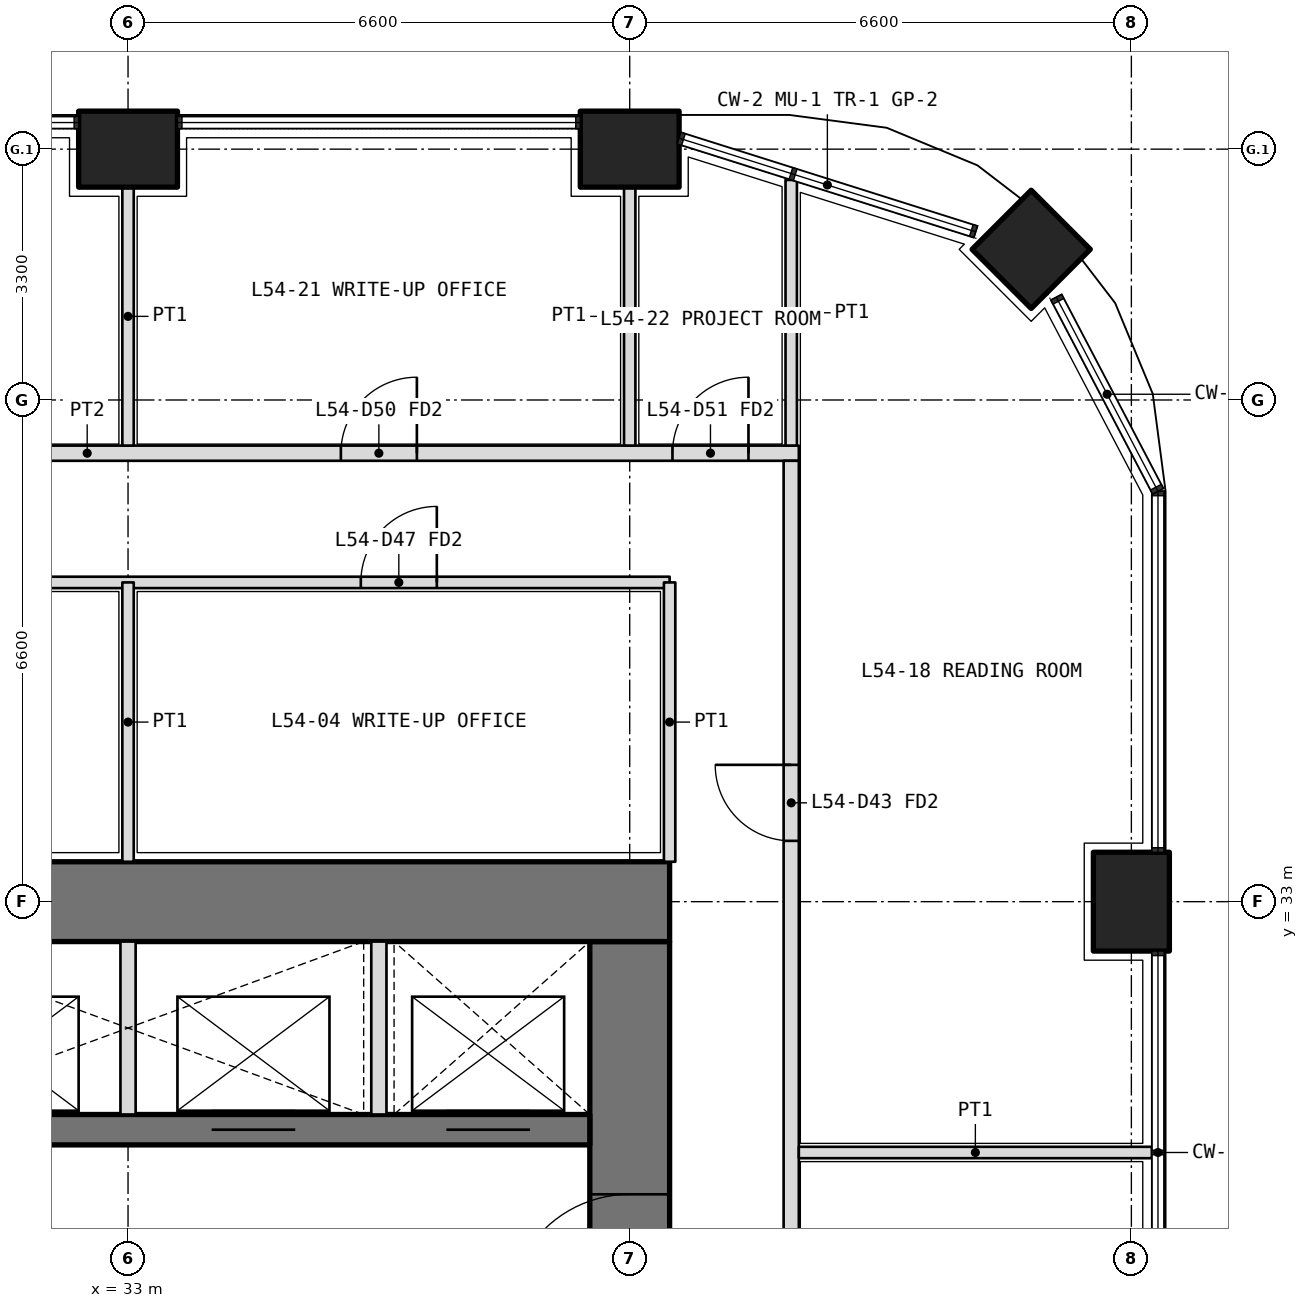
"""IFC4 building model, lengths in metres.
Left out: names, types, materials, properties, quantities, classifications, styles, units other than length and angle.
Written with IfcOpenShell. Run it as: python <this file> out.ifc"""

import sys

from ifc_helpers import new_model, si_unit, direction, frame, frame_2d, origin, origin_2d, place, context, subcontext, project, spatial, rectangle, extrude, element, fill, save


model = new_model("IFC4")
c1 = context("Model", 3, precision=1e-05, world=origin(), true_north=direction((0.0, 1.0)))
c2 = subcontext(c1, "Body", "Model", "MODEL_VIEW")
j1 = project(units=[si_unit("LENGTHUNIT", "METRE"), si_unit("PLANEANGLEUNIT", "RADIAN")], contexts=[c1])
p1 = place(None, origin())
s1 = spatial("IfcSite", under=j1, at=p1, CompositionType="ELEMENT")
p2 = place(p1, origin())
s2 = spatial("IfcBuilding", under=s1, at=p2, CompositionType="ELEMENT")
p3 = place(p2, frame((0.0, 0.0, 237.6)))
s3 = spatial("IfcBuildingStorey", under=s2, at=p3, CompositionType="ELEMENT", Elevation=237.6)
p4 = place(p3, frame((44.882, 41.582, 0.0), z_axis=(0.0, 0.0, 1.0), x_axis=(0.707106781187, 0.707106781187, 0.0)))
e1 = element("IfcColumn", 1, at=p4, inside=s3, PredefinedType="COLUMN", context=c2, shape_type="SweptSolid", body=[
    extrude(rectangle(XDim=1.1, YDim=1.1, at=origin_2d()), origin(), (0.0, 0.0, 1.0), 4.2),
])
for number, where, z_axis, x_axis in (
    (2, (46.2, 33.0, 0.0), (0.0, 0.0, 1.0), (0.0, 1.0, 0.0)),
    (3, (33.0, 42.9, 0.0), (0.0, 0.0, 1.0), (1.0, 0.0, 0.0)),
    (4, (39.6, 42.9, 0.0), (0.0, 0.0, 1.0), (1.0, 0.0, 0.0)),
):
    element("IfcColumn", number, at=place(p3, frame(where, z_axis=z_axis, x_axis=x_axis)), inside=s3, PredefinedType="COLUMN", context=c2, shape_type="SweptSolid", body=[
        extrude(rectangle(XDim=1.3, YDim=1.0, at=origin_2d()), origin(), (0.0, 0.0, 1.0), 4.2),
    ])
p5 = place(p3, frame((39.6, 13.725, 0.0), z_axis=(0.0, 0.0, 1.0), x_axis=(0.0, 1.0, 0.0)))
e5 = element("IfcWall", 5, at=p5, inside=s3, PredefinedType="SHEAR", context=c2, shape_type="SweptSolid", body=[
    extrude(rectangle(XDim=18.75, YDim=1.05, at=frame_2d((9.375, 0.0))), origin(), (0.0, 0.0, 1.0), 4.2),
])
p6 = place(p5, frame((3.025, 0.0, 0.0)))
e6 = element("IfcOpeningElement", 6, at=p6, cuts=e5, PredefinedType="OPENING", context=c2, shape_type="SweptSolid", body=[
    extrude(rectangle(XDim=1.6, YDim=2.1, at=frame_2d((0.8, 1.05))), frame((0.0, 0.535, 0.0), z_axis=(0.0, -1.0, 0.0), x_axis=(1.0, 0.0, 0.0)), (0.0, 0.0, 1.0), 1.07),
])
p7 = place(p5, frame((13.825, 0.0, 0.0)))
e7 = element("IfcOpeningElement", 7, at=p7, cuts=e5, PredefinedType="OPENING", context=c2, shape_type="SweptSolid", body=[
    extrude(rectangle(XDim=1.6, YDim=2.1, at=frame_2d((0.8, 1.05))), frame((0.0, 0.535, 0.0), z_axis=(0.0, -1.0, 0.0), x_axis=(1.0, 0.0, 0.0)), (0.0, 0.0, 1.0), 1.07),
])
p8 = place(p3, frame((40.125, 33.0, 0.0), z_axis=(0.0, 0.0, 1.0), x_axis=(-1.0, 0.0, 0.0)))
e8 = element("IfcWall", 8, at=p8, inside=s3, PredefinedType="SHEAR", context=c2, shape_type="SweptSolid", body=[
    extrude(rectangle(XDim=27.45, YDim=1.05, at=frame_2d((13.725, 0.0))), origin(), (0.0, 0.0, 1.0), 4.2),
])
p9 = place(p3, frame((13.725, 30.0, 0.0), z_axis=(0.0, 0.0, 1.0), x_axis=(1.0, 0.0, 0.0)))
e9 = element("IfcWall", 9, at=p9, inside=s3, PredefinedType="SHEAR", context=c2, shape_type="SweptSolid", body=[
    extrude(rectangle(XDim=25.35, YDim=0.4, at=frame_2d((12.675, 0.0))), origin(), (0.0, 0.0, 1.0), 4.2),
])
p10 = place(p9, frame((0.837, 0.0, 0.0)))
e10 = element("IfcOpeningElement", 10, at=p10, cuts=e9, PredefinedType="OPENING", context=c2, shape_type="SweptSolid", body=[
    extrude(rectangle(XDim=1.0, YDim=2.1, at=frame_2d((0.5, 1.05))), frame((0.0, 0.21, 0.0), z_axis=(0.0, -1.0, 0.0), x_axis=(1.0, 0.0, 0.0)), (0.0, 0.0, 1.0), 0.42),
])
p11 = place(p9, frame((3.925, 0.0, 0.0)))
e11 = element("IfcOpeningElement", 11, at=p11, cuts=e9, PredefinedType="OPENING", context=c2, shape_type="SweptSolid", body=[
    extrude(rectangle(XDim=1.0, YDim=2.1, at=frame_2d((0.5, 1.05))), frame((0.0, 0.21, 0.0), z_axis=(0.0, -1.0, 0.0), x_axis=(1.0, 0.0, 0.0)), (0.0, 0.0, 1.0), 0.42),
])
p12 = place(p9, frame((7.225, 0.0, 0.0)))
e12 = element("IfcOpeningElement", 12, at=p12, cuts=e9, PredefinedType="OPENING", context=c2, shape_type="SweptSolid", body=[
    extrude(rectangle(XDim=1.0, YDim=2.1, at=frame_2d((0.5, 1.05))), frame((0.0, 0.21, 0.0), z_axis=(0.0, -1.0, 0.0), x_axis=(1.0, 0.0, 0.0)), (0.0, 0.0, 1.0), 0.42),
])
p13 = place(p9, frame((10.525, 0.0, 0.0)))
e13 = element("IfcOpeningElement", 13, at=p13, cuts=e9, PredefinedType="OPENING", context=c2, shape_type="SweptSolid", body=[
    extrude(rectangle(XDim=1.0, YDim=2.1, at=frame_2d((0.5, 1.05))), frame((0.0, 0.21, 0.0), z_axis=(0.0, -1.0, 0.0), x_axis=(1.0, 0.0, 0.0)), (0.0, 0.0, 1.0), 0.42),
])
p14 = place(p9, frame((13.775, 0.0, 0.0)))
e14 = element("IfcOpeningElement", 14, at=p14, cuts=e9, PredefinedType="OPENING", context=c2, shape_type="SweptSolid", body=[
    extrude(rectangle(XDim=1.1, YDim=2.1, at=frame_2d((0.55, 1.05))), frame((0.0, 0.21, 0.0), z_axis=(0.0, -1.0, 0.0), x_axis=(1.0, 0.0, 0.0)), (0.0, 0.0, 1.0), 0.42),
])
p15 = place(p9, frame((17.075, 0.0, 0.0)))
e15 = element("IfcOpeningElement", 15, at=p15, cuts=e9, PredefinedType="OPENING", context=c2, shape_type="SweptSolid", body=[
    extrude(rectangle(XDim=1.1, YDim=2.1, at=frame_2d((0.55, 1.05))), frame((0.0, 0.21, 0.0), z_axis=(0.0, -1.0, 0.0), x_axis=(1.0, 0.0, 0.0)), (0.0, 0.0, 1.0), 0.42),
])
p16 = place(p9, frame((20.375, 0.0, 0.0)))
e16 = element("IfcOpeningElement", 16, at=p16, cuts=e9, PredefinedType="OPENING", context=c2, shape_type="SweptSolid", body=[
    extrude(rectangle(XDim=1.1, YDim=2.1, at=frame_2d((0.55, 1.05))), frame((0.0, 0.21, 0.0), z_axis=(0.0, -1.0, 0.0), x_axis=(1.0, 0.0, 0.0)), (0.0, 0.0, 1.0), 0.42),
])
p17 = place(p9, frame((23.462, 0.0, 0.0)))
e17 = element("IfcOpeningElement", 17, at=p17, cuts=e9, PredefinedType="OPENING", context=c2, shape_type="SweptSolid", body=[
    extrude(rectangle(XDim=1.1, YDim=2.1, at=frame_2d((0.55, 1.05))), frame((0.0, 0.21, 0.0), z_axis=(0.0, -1.0, 0.0), x_axis=(1.0, 0.0, 0.0)), (0.0, 0.0, 1.0), 0.42),
])
for number, where, z_axis, x_axis in (
    (18, (33.0, 30.2, 0.0), (0.0, 0.0, 1.0), (0.0, 1.0, 0.0)),
    (19, (36.3, 30.2, 0.0), (0.0, 0.0, 1.0), (0.0, 1.0, 0.0)),
):
    element("IfcWall", number, at=place(p3, frame(where, z_axis=z_axis, x_axis=x_axis)), inside=s3, PredefinedType="PARTITIONING", context=c2, shape_type="SweptSolid", body=[
        extrude(rectangle(XDim=2.275, YDim=0.2, at=frame_2d((1.138, 0.0))), origin(), (0.0, 0.0, 1.0), 4.2),
    ])
p18 = place(p3, frame((12.675, 37.2, 0.0), z_axis=(0.0, 0.0, 1.0), x_axis=(1.0, 0.0, 0.0)))
e20 = element("IfcWall", 20, at=p18, inside=s3, PredefinedType="PARTITIONING", context=c2, shape_type="SweptSolid", body=[
    extrude(rectangle(XDim=27.45, YDim=0.15, at=frame_2d((13.725, 0.0))), origin(), (0.0, 0.0, 1.0), 3.0),
])
p19 = place(p18, frame((1.413, 0.0, 0.0)))
e21 = element("IfcOpeningElement", 21, at=p19, cuts=e20, PredefinedType="OPENING", context=c2, shape_type="SweptSolid", body=[
    extrude(rectangle(XDim=1.0, YDim=2.1, at=frame_2d((0.5, 1.05))), frame((0.0, 0.085, 0.0), z_axis=(0.0, -1.0, 0.0), x_axis=(1.0, 0.0, 0.0)), (0.0, 0.0, 1.0), 0.17),
])
p20 = place(p18, frame((6.625, 0.0, 0.0)))
e22 = element("IfcOpeningElement", 22, at=p20, cuts=e20, PredefinedType="OPENING", context=c2, shape_type="SweptSolid", body=[
    extrude(rectangle(XDim=1.0, YDim=2.1, at=frame_2d((0.5, 1.05))), frame((0.0, 0.085, 0.0), z_axis=(0.0, -1.0, 0.0), x_axis=(1.0, 0.0, 0.0)), (0.0, 0.0, 1.0), 0.17),
])
p21 = place(p18, frame((14.875, 0.0, 0.0)))
e23 = element("IfcOpeningElement", 23, at=p21, cuts=e20, PredefinedType="OPENING", context=c2, shape_type="SweptSolid", body=[
    extrude(rectangle(XDim=1.0, YDim=2.1, at=frame_2d((0.5, 1.05))), frame((0.0, 0.085, 0.0), z_axis=(0.0, -1.0, 0.0), x_axis=(1.0, 0.0, 0.0)), (0.0, 0.0, 1.0), 0.17),
])
p22 = place(p18, frame((23.387, 0.0, 0.0)))
e24 = element("IfcOpeningElement", 24, at=p22, cuts=e20, PredefinedType="OPENING", context=c2, shape_type="SweptSolid", body=[
    extrude(rectangle(XDim=1.0, YDim=2.1, at=frame_2d((0.5, 1.05))), frame((0.0, 0.085, 0.0), z_axis=(0.0, -1.0, 0.0), x_axis=(1.0, 0.0, 0.0)), (0.0, 0.0, 1.0), 0.17),
])
for number, where, z_axis, x_axis in (
    (25, (40.125, 33.525, 0.0), (0.0, 0.0, 1.0), (0.0, 1.0, 0.0)),
    (26, (33.0, 33.525, 0.0), (0.0, 0.0, 1.0), (0.0, 1.0, 0.0)),
):
    element("IfcWall", number, at=place(p3, frame(where, z_axis=z_axis, x_axis=x_axis)), inside=s3, PredefinedType="PARTITIONING", context=c2, shape_type="SweptSolid", body=[
        extrude(rectangle(XDim=3.675, YDim=0.15, at=frame_2d((1.837, 0.0))), origin(), (0.0, 0.0, 1.0), 3.0),
    ])
p23 = place(p3, frame((23.1, 38.9, 0.0), z_axis=(0.0, 0.0, 1.0), x_axis=(1.0, 0.0, 0.0)))
e27 = element("IfcWall", 27, at=p23, inside=s3, PredefinedType="PARTITIONING", context=c2, shape_type="SweptSolid", body=[
    extrude(rectangle(XDim=18.725, YDim=0.2, at=frame_2d((9.362, 0.0))), origin(), (0.0, 0.0, 1.0), 3.0),
])
p24 = place(p23, frame((4.45, 0.0, 0.0)))
e28 = element("IfcOpeningElement", 28, at=p24, cuts=e27, PredefinedType="OPENING", context=c2, shape_type="SweptSolid", body=[
    extrude(rectangle(XDim=1.0, YDim=2.1, at=frame_2d((0.5, 1.05))), frame((0.0, 0.11, 0.0), z_axis=(0.0, -1.0, 0.0), x_axis=(1.0, 0.0, 0.0)), (0.0, 0.0, 1.0), 0.22),
])
p25 = place(p23, frame((12.7, 0.0, 0.0)))
e29 = element("IfcOpeningElement", 29, at=p25, cuts=e27, PredefinedType="OPENING", context=c2, shape_type="SweptSolid", body=[
    extrude(rectangle(XDim=1.0, YDim=2.1, at=frame_2d((0.5, 1.05))), frame((0.0, 0.11, 0.0), z_axis=(0.0, -1.0, 0.0), x_axis=(1.0, 0.0, 0.0)), (0.0, 0.0, 1.0), 0.22),
])
p26 = place(p23, frame((17.062, 0.0, 0.0)))
e30 = element("IfcOpeningElement", 30, at=p26, cuts=e27, PredefinedType="OPENING", context=c2, shape_type="SweptSolid", body=[
    extrude(rectangle(XDim=1.0, YDim=2.1, at=frame_2d((0.5, 1.05))), frame((0.0, 0.11, 0.0), z_axis=(0.0, -1.0, 0.0), x_axis=(1.0, 0.0, 0.0)), (0.0, 0.0, 1.0), 0.22),
])
p27 = place(p3, frame((41.725, 7.4, 0.0), z_axis=(0.0, 0.0, 1.0), x_axis=(0.0, 1.0, 0.0)))
e31 = element("IfcWall", 31, at=p27, inside=s3, PredefinedType="PARTITIONING", context=c2, shape_type="SweptSolid", body=[
    extrude(rectangle(XDim=31.4, YDim=0.2, at=frame_2d((15.7, 0.0))), origin(), (0.0, 0.0, 1.0), 3.0),
])
p28 = place(p27, frame((5.65, 0.0, 0.0)))
e32 = element("IfcOpeningElement", 32, at=p28, cuts=e31, PredefinedType="OPENING", context=c2, shape_type="SweptSolid", body=[
    extrude(rectangle(XDim=1.0, YDim=2.1, at=frame_2d((0.5, 1.05))), frame((0.0, 0.11, 0.0), z_axis=(0.0, -1.0, 0.0), x_axis=(1.0, 0.0, 0.0)), (0.0, 0.0, 1.0), 0.22),
])
p29 = place(p27, frame((13.4, 0.0, 0.0)))
e33 = element("IfcOpeningElement", 33, at=p29, cuts=e31, PredefinedType="OPENING", context=c2, shape_type="SweptSolid", body=[
    extrude(rectangle(XDim=1.0, YDim=2.1, at=frame_2d((0.5, 1.05))), frame((0.0, 0.11, 0.0), z_axis=(0.0, -1.0, 0.0), x_axis=(1.0, 0.0, 0.0)), (0.0, 0.0, 1.0), 0.22),
])
p30 = place(p27, frame((16.75, 0.0, 0.0)))
e34 = element("IfcOpeningElement", 34, at=p30, cuts=e31, PredefinedType="OPENING", context=c2, shape_type="SweptSolid", body=[
    extrude(rectangle(XDim=0.9, YDim=2.1, at=frame_2d((0.45, 1.05))), frame((0.0, 0.11, 0.0), z_axis=(0.0, -1.0, 0.0), x_axis=(1.0, 0.0, 0.0)), (0.0, 0.0, 1.0), 0.22),
])
p31 = place(p27, frame((20.15, 0.0, 0.0)))
e35 = element("IfcOpeningElement", 35, at=p31, cuts=e31, PredefinedType="OPENING", context=c2, shape_type="SweptSolid", body=[
    extrude(rectangle(XDim=1.0, YDim=2.1, at=frame_2d((0.5, 1.05))), frame((0.0, 0.11, 0.0), z_axis=(0.0, -1.0, 0.0), x_axis=(1.0, 0.0, 0.0)), (0.0, 0.0, 1.0), 0.22),
])
p32 = place(p27, frame((26.4, 0.0, 0.0)))
e36 = element("IfcOpeningElement", 36, at=p32, cuts=e31, PredefinedType="OPENING", context=c2, shape_type="SweptSolid", body=[
    extrude(rectangle(XDim=1.0, YDim=2.1, at=frame_2d((0.5, 1.05))), frame((0.0, 0.11, 0.0), z_axis=(0.0, -1.0, 0.0), x_axis=(1.0, 0.0, 0.0)), (0.0, 0.0, 1.0), 0.22),
])
p33 = place(p3, frame((41.725, 42.495, 0.0), z_axis=(0.0, 0.0, 1.0), x_axis=(0.0, -1.0, 0.0)))
e37 = element("IfcWall", 37, at=p33, inside=s3, PredefinedType="PARTITIONING", context=c2, shape_type="SweptSolid", body=[
    extrude(rectangle(XDim=3.495, YDim=0.15, at=frame_2d((1.748, 0.0))), origin(), (0.0, 0.0, 1.0), 2.7),
])
p34 = place(p3, frame((46.47, 29.7, 0.0), z_axis=(0.0, 0.0, 1.0), x_axis=(-1.0, 0.0, 0.0)))
e38 = element("IfcWall", 38, at=p34, inside=s3, PredefinedType="PARTITIONING", context=c2, shape_type="SweptSolid", body=[
    extrude(rectangle(XDim=4.645, YDim=0.15, at=frame_2d((2.323, 0.0))), origin(), (0.0, 0.0, 1.0), 2.7),
])
for number, where, z_axis, x_axis in (
    (39, (33.0, 42.4, 0.0), (0.0, 0.0, 1.0), (0.0, -1.0, 0.0)),
    (40, (39.6, 42.4, 0.0), (0.0, 0.0, 1.0), (0.0, -1.0, 0.0)),
):
    element("IfcWall", number, at=place(p3, frame(where, z_axis=z_axis, x_axis=x_axis)), inside=s3, PredefinedType="PARTITIONING", context=c2, shape_type="SweptSolid", body=[
        extrude(rectangle(XDim=3.4, YDim=0.15, at=frame_2d((1.7, 0.0))), origin(), (0.0, 0.0, 1.0), 3.0),
    ])
p35 = place(p22, origin())
e41 = element("IfcDoor", 41, at=p35, inside=s3, OperationType="SINGLE_SWING_RIGHT", PredefinedType="DOOR", context=c2, shape_type="SweptSolid", body=[
    extrude(rectangle(XDim=1.0, YDim=2.1, at=frame_2d((0.5, 1.05))), frame((0.0, 0.025, 0.0), z_axis=(0.0, -1.0, 0.0), x_axis=(1.0, 0.0, 0.0)), (0.0, 0.0, 1.0), 0.05),
])
fill(e24, e41)
p36 = place(p32, origin())
e42 = element("IfcDoor", 42, at=p36, inside=s3, OperationType="SINGLE_SWING_RIGHT", PredefinedType="DOOR", context=c2, shape_type="SweptSolid", body=[
    extrude(rectangle(XDim=1.0, YDim=2.1, at=frame_2d((0.5, 1.05))), frame((0.0, 0.025, 0.0), z_axis=(0.0, -1.0, 0.0), x_axis=(1.0, 0.0, 0.0)), (0.0, 0.0, 1.0), 0.05),
])
fill(e36, e42)
p37 = place(p25, origin())
e43 = element("IfcDoor", 43, at=p37, inside=s3, OperationType="SINGLE_SWING_RIGHT", PredefinedType="DOOR", context=c2, shape_type="SweptSolid", body=[
    extrude(rectangle(XDim=1.0, YDim=2.1, at=frame_2d((0.5, 1.05))), frame((0.0, 0.025, 0.0), z_axis=(0.0, -1.0, 0.0), x_axis=(1.0, 0.0, 0.0)), (0.0, 0.0, 1.0), 0.05),
])
fill(e29, e43)
p38 = place(p26, origin())
e44 = element("IfcDoor", 44, at=p38, inside=s3, OperationType="SINGLE_SWING_RIGHT", PredefinedType="DOOR", context=c2, shape_type="SweptSolid", body=[
    extrude(rectangle(XDim=1.0, YDim=2.1, at=frame_2d((0.5, 1.05))), frame((0.0, 0.025, 0.0), z_axis=(0.0, -1.0, 0.0), x_axis=(1.0, 0.0, 0.0)), (0.0, 0.0, 1.0), 0.05),
])
fill(e30, e44)
p39 = place(p7, origin())
e45 = element("IfcDoor", 45, at=p39, inside=s3, OperationType="DOUBLE_DOOR_DOUBLE_SWING", PredefinedType="DOOR", context=c2, shape_type="SweptSolid", body=[
    extrude(rectangle(XDim=1.6, YDim=2.1, at=frame_2d((0.8, 1.05))), frame((0.0, 0.025, 0.0), z_axis=(0.0, -1.0, 0.0), x_axis=(1.0, 0.0, 0.0)), (0.0, 0.0, 1.0), 0.05),
])
fill(e7, e45)
p40 = place(p16, origin())
e46 = element("IfcDoor", 46, at=p40, inside=s3, OperationType="DOUBLE_DOOR_SLIDING", PredefinedType="DOOR", context=c2, shape_type="SweptSolid", body=[
    extrude(rectangle(XDim=1.1, YDim=2.1, at=frame_2d((0.55, 1.05))), frame((0.0, 0.025, 0.0), z_axis=(0.0, -1.0, 0.0), x_axis=(1.0, 0.0, 0.0)), (0.0, 0.0, 1.0), 0.05),
])
fill(e16, e46)
p41 = place(p17, origin())
e47 = element("IfcDoor", 47, at=p41, inside=s3, OperationType="DOUBLE_DOOR_SLIDING", PredefinedType="DOOR", context=c2, shape_type="SweptSolid", body=[
    extrude(rectangle(XDim=1.1, YDim=2.1, at=frame_2d((0.55, 1.05))), frame((0.0, 0.025, 0.0), z_axis=(0.0, -1.0, 0.0), x_axis=(1.0, 0.0, 0.0)), (0.0, 0.0, 1.0), 0.05),
])
fill(e17, e47)
save(model, sys.argv[1])
